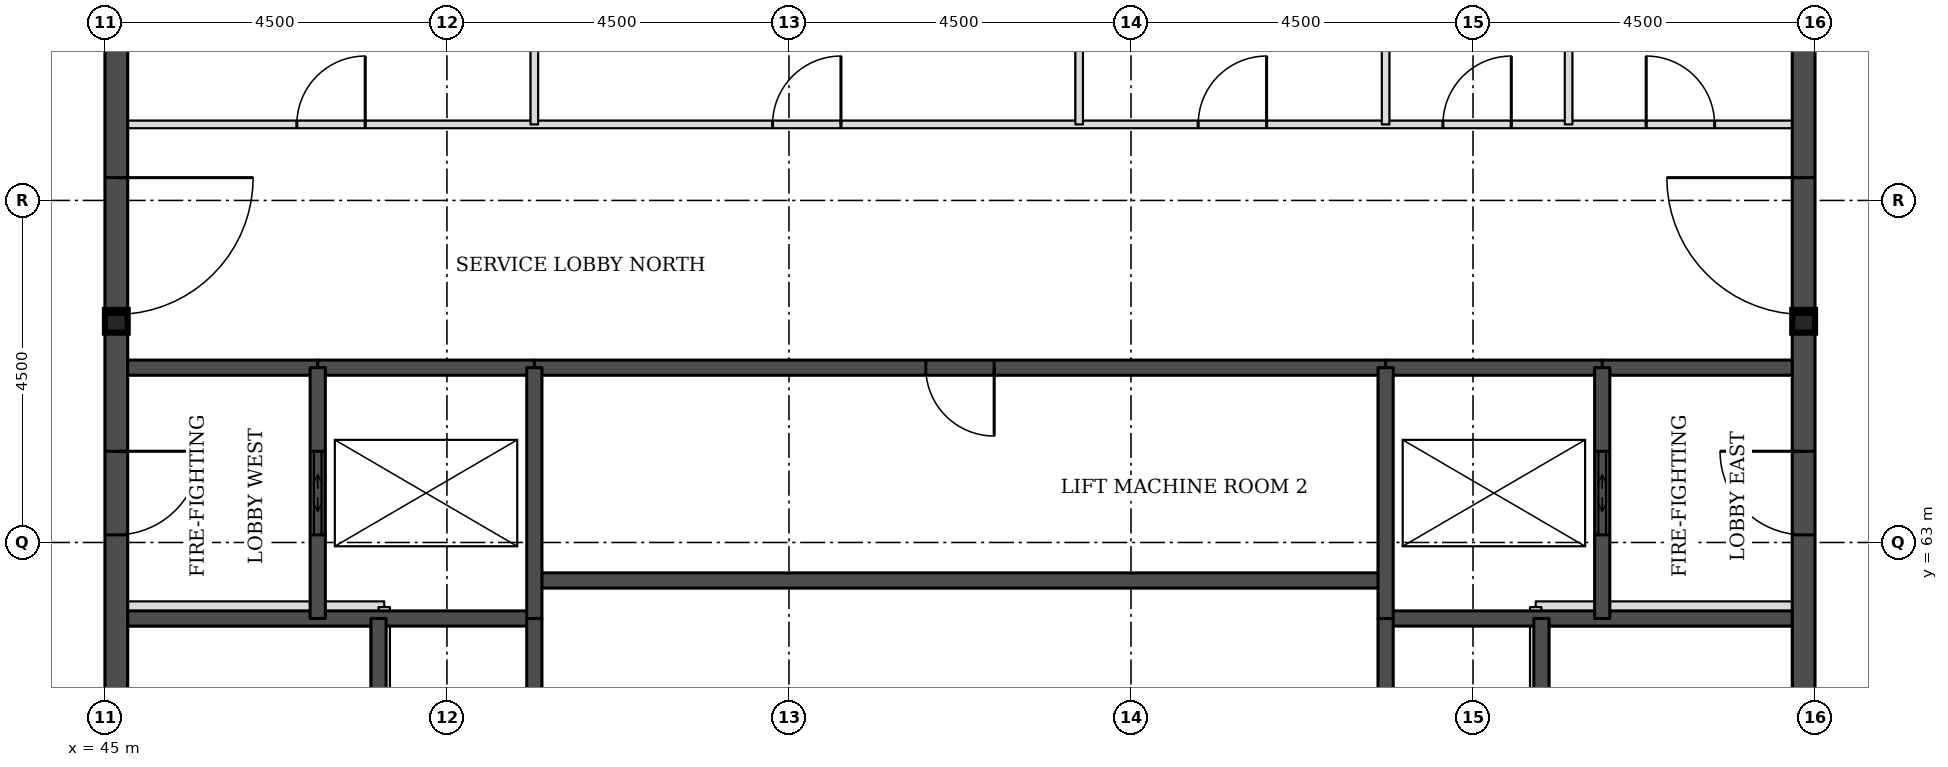
"""IFC4 building model, lengths in metres.
Left out: names, types, materials, properties, quantities, classifications, styles, units other than length and angle.
Written with IfcOpenShell. Run it as: python <this file> out.ifc"""

import sys

from ifc_helpers import new_model, si_unit, direction, frame, frame_2d, origin, place, context, subcontext, project, spatial, rectangle, extrude, element, fill, save


model = new_model("IFC4")
c1 = context("Model", 3, precision=1e-05, world=origin(), true_north=direction((0.0, 1.0)))
c2 = subcontext(c1, "Body", "Model", "MODEL_VIEW")
j1 = project(units=[si_unit("LENGTHUNIT", "METRE"), si_unit("PLANEANGLEUNIT", "RADIAN")], contexts=[c1])
p1 = place(None, origin())
s1 = spatial("IfcSite", under=j1, at=p1, CompositionType="ELEMENT")
p2 = place(p1, origin())
s2 = spatial("IfcBuilding", under=s1, at=p2, CompositionType="ELEMENT")
p3 = place(p2, frame((0.0, 0.0, 268.7)))
s3 = spatial("IfcBuildingStorey", under=s2, at=p3, CompositionType="ELEMENT", Elevation=268.7)
p4 = place(p3, frame((45.15, 49.5, 0.0), z_axis=(0.0, 0.0, 1.0), x_axis=(0.0, 1.0, 0.0)))
e1 = element("IfcWall", 1, at=p4, inside=s3, PredefinedType="SHEAR", context=c2, shape_type="SweptSolid", body=[
    extrude(rectangle(XDim=22.5, YDim=0.3, at=frame_2d((11.25, 0.0))), origin(), (0.0, 0.0, 1.0), 5.0),
])
p5 = place(p4, frame((4.2, 0.0, 0.0)))
e2 = element("IfcOpeningElement", 2, at=p5, cuts=e1, PredefinedType="OPENING", context=c2, shape_type="SweptSolid", body=[
    extrude(rectangle(XDim=1.8, YDim=2.1, at=frame_2d((0.9, 1.05))), frame((0.0, 0.16, 0.0), z_axis=(0.0, -1.0, 0.0), x_axis=(1.0, 0.0, 0.0)), (0.0, 0.0, 1.0), 0.32),
])
p6 = place(p4, frame((6.9, 0.0, 0.0)))
e3 = element("IfcOpeningElement", 3, at=p6, cuts=e1, PredefinedType="OPENING", context=c2, shape_type="SweptSolid", body=[
    extrude(rectangle(XDim=1.1, YDim=2.1, at=frame_2d((0.55, 1.05))), frame((0.0, 0.16, 0.0), z_axis=(0.0, -1.0, 0.0), x_axis=(1.0, 0.0, 0.0)), (0.0, 0.0, 1.0), 0.32),
])
p7 = place(p4, frame((13.6, 0.0, 0.0)))
e4 = element("IfcOpeningElement", 4, at=p7, cuts=e1, PredefinedType="OPENING", context=c2, shape_type="SweptSolid", body=[
    extrude(rectangle(XDim=1.1, YDim=2.1, at=frame_2d((0.55, 1.05))), frame((0.0, 0.16, 0.0), z_axis=(0.0, -1.0, 0.0), x_axis=(1.0, 0.0, 0.0)), (0.0, 0.0, 1.0), 0.32),
])
p8 = place(p4, frame((16.5, 0.0, 0.0)))
e5 = element("IfcOpeningElement", 5, at=p8, cuts=e1, PredefinedType="OPENING", context=c2, shape_type="SweptSolid", body=[
    extrude(rectangle(XDim=1.8, YDim=2.1, at=frame_2d((0.9, 1.05))), frame((0.0, 0.16, 0.0), z_axis=(0.0, -1.0, 0.0), x_axis=(1.0, 0.0, 0.0)), (0.0, 0.0, 1.0), 0.32),
])
p9 = place(p3, frame((67.35, 49.5, 0.0), z_axis=(0.0, 0.0, 1.0), x_axis=(0.0, 1.0, 0.0)))
e6 = element("IfcWall", 6, at=p9, inside=s3, PredefinedType="SHEAR", context=c2, shape_type="SweptSolid", body=[
    extrude(rectangle(XDim=22.5, YDim=0.3, at=frame_2d((11.25, 0.0))), origin(), (0.0, 0.0, 1.0), 5.0),
])
p10 = place(p9, frame((4.2, 0.0, 0.0)))
e7 = element("IfcOpeningElement", 7, at=p10, cuts=e6, PredefinedType="OPENING", context=c2, shape_type="SweptSolid", body=[
    extrude(rectangle(XDim=1.8, YDim=2.1, at=frame_2d((0.9, 1.05))), frame((0.0, 0.16, 0.0), z_axis=(0.0, -1.0, 0.0), x_axis=(1.0, 0.0, 0.0)), (0.0, 0.0, 1.0), 0.32),
])
p11 = place(p9, frame((6.9, 0.0, 0.0)))
e8 = element("IfcOpeningElement", 8, at=p11, cuts=e6, PredefinedType="OPENING", context=c2, shape_type="SweptSolid", body=[
    extrude(rectangle(XDim=1.1, YDim=2.1, at=frame_2d((0.55, 1.05))), frame((0.0, 0.16, 0.0), z_axis=(0.0, -1.0, 0.0), x_axis=(1.0, 0.0, 0.0)), (0.0, 0.0, 1.0), 0.32),
])
p12 = place(p9, frame((13.6, 0.0, 0.0)))
e9 = element("IfcOpeningElement", 9, at=p12, cuts=e6, PredefinedType="OPENING", context=c2, shape_type="SweptSolid", body=[
    extrude(rectangle(XDim=1.1, YDim=2.1, at=frame_2d((0.55, 1.05))), frame((0.0, 0.16, 0.0), z_axis=(0.0, -1.0, 0.0), x_axis=(1.0, 0.0, 0.0)), (0.0, 0.0, 1.0), 0.32),
])
p13 = place(p9, frame((16.5, 0.0, 0.0)))
e10 = element("IfcOpeningElement", 10, at=p13, cuts=e6, PredefinedType="OPENING", context=c2, shape_type="SweptSolid", body=[
    extrude(rectangle(XDim=1.8, YDim=2.1, at=frame_2d((0.9, 1.05))), frame((0.0, 0.16, 0.0), z_axis=(0.0, -1.0, 0.0), x_axis=(1.0, 0.0, 0.0)), (0.0, 0.0, 1.0), 0.32),
])
for number, where, z_axis, x_axis in (
    (11, (45.3, 62.0, 0.0), (0.0, 0.0, 1.0), (1.0, 0.0, 0.0)),
    (12, (61.85, 62.0, 0.0), (0.0, 0.0, 1.0), (1.0, 0.0, 0.0)),
):
    element("IfcWall", number, at=place(p3, frame(where, z_axis=z_axis, x_axis=x_axis)), inside=s3, PredefinedType="SOLIDWALL", context=c2, shape_type="SweptSolid", body=[
        extrude(rectangle(XDim=5.35, YDim=0.2, at=frame_2d((2.675, 0.0))), origin(), (0.0, 0.0, 1.0), 4.75),
    ])
p14 = place(p3, frame((50.65, 62.5, 0.0), z_axis=(0.0, 0.0, 1.0), x_axis=(1.0, 0.0, 0.0)))
e13 = element("IfcWall", 13, at=p14, inside=s3, PredefinedType="SOLIDWALL", context=c2, shape_type="SweptSolid", body=[
    extrude(rectangle(XDim=11.2, YDim=0.2, at=frame_2d((5.6, 0.0))), origin(), (0.0, 0.0, 1.0), 4.75),
])
for number, where, z_axis, x_axis in (
    (14, (45.3, 65.3, 0.0), (0.0, 0.0, 1.0), (1.0, 0.0, 0.0)),
    (15, (64.7, 65.3, 0.0), (0.0, 0.0, 1.0), (1.0, 0.0, 0.0)),
):
    element("IfcWall", number, at=place(p3, frame(where, z_axis=z_axis, x_axis=x_axis)), inside=s3, PredefinedType="SOLIDWALL", context=c2, shape_type="SweptSolid", body=[
        extrude(rectangle(XDim=2.5, YDim=0.2, at=frame_2d((1.25, 0.0))), origin(), (0.0, 0.0, 1.0), 4.75),
    ])
p15 = place(p3, frame((50.65, 65.3, 0.0), z_axis=(0.0, 0.0, 1.0), x_axis=(1.0, 0.0, 0.0)))
e16 = element("IfcWall", 16, at=p15, inside=s3, PredefinedType="SOLIDWALL", context=c2, shape_type="SweptSolid", body=[
    extrude(rectangle(XDim=11.2, YDim=0.2, at=frame_2d((5.6, 0.0))), origin(), (0.0, 0.0, 1.0), 4.75),
])
p16 = place(p15, frame((5.15, 0.0, 0.0)))
e17 = element("IfcOpeningElement", 17, at=p16, cuts=e16, PredefinedType="OPENING", context=c2, shape_type="SweptSolid", body=[
    extrude(rectangle(XDim=0.9, YDim=2.1, at=frame_2d((0.45, 1.05))), frame((0.0, 0.11, 0.0), z_axis=(0.0, -1.0, 0.0), x_axis=(1.0, 0.0, 0.0)), (0.0, 0.0, 1.0), 0.22),
])
for number, where, z_axis, x_axis in (
    (18, (47.8, 65.3, 0.0), (0.0, 0.0, 1.0), (1.0, 0.0, 0.0)),
    (19, (61.85, 65.3, 0.0), (0.0, 0.0, 1.0), (1.0, 0.0, 0.0)),
):
    element("IfcWall", number, at=place(p3, frame(where, z_axis=z_axis, x_axis=x_axis)), inside=s3, PredefinedType="SOLIDWALL", context=c2, shape_type="SweptSolid", body=[
        extrude(rectangle(XDim=2.85, YDim=0.2, at=frame_2d((1.425, 0.0))), origin(), (0.0, 0.0, 1.0), 4.75),
    ])
p17 = place(p3, frame((45.3, 68.5, 0.0), z_axis=(0.0, 0.0, 1.0), x_axis=(1.0, 0.0, 0.0)))
e20 = element("IfcWall", 20, at=p17, inside=s3, PredefinedType="PARTITIONING", context=c2, shape_type="SweptSolid", body=[
    extrude(rectangle(XDim=21.9, YDim=0.1, at=frame_2d((10.95, 0.0))), origin(), (0.0, 0.0, 1.0), 4.75),
])
p18 = place(p17, frame((19.979, 0.0, 0.0)))
e21 = element("IfcOpeningElement", 21, at=p18, cuts=e20, PredefinedType="OPENING", context=c2, shape_type="SweptSolid", body=[
    extrude(rectangle(XDim=0.9, YDim=2.1, at=frame_2d((0.45, 1.05))), frame((0.0, 0.06, 0.0), z_axis=(0.0, -1.0, 0.0), x_axis=(1.0, 0.0, 0.0)), (0.0, 0.0, 1.0), 0.12),
])
p19 = place(p17, frame((17.304, 0.0, 0.0)))
e22 = element("IfcOpeningElement", 22, at=p19, cuts=e20, PredefinedType="OPENING", context=c2, shape_type="SweptSolid", body=[
    extrude(rectangle(XDim=0.9, YDim=2.1, at=frame_2d((0.45, 1.05))), frame((0.0, 0.06, 0.0), z_axis=(0.0, -1.0, 0.0), x_axis=(1.0, 0.0, 0.0)), (0.0, 0.0, 1.0), 0.12),
])
p20 = place(p17, frame((2.225, 0.0, 0.0)))
e23 = element("IfcOpeningElement", 23, at=p20, cuts=e20, PredefinedType="OPENING", context=c2, shape_type="SweptSolid", body=[
    extrude(rectangle(XDim=0.9, YDim=2.1, at=frame_2d((0.45, 1.05))), frame((0.0, 0.06, 0.0), z_axis=(0.0, -1.0, 0.0), x_axis=(1.0, 0.0, 0.0)), (0.0, 0.0, 1.0), 0.12),
])
p21 = place(p17, frame((14.084, 0.0, 0.0)))
e24 = element("IfcOpeningElement", 24, at=p21, cuts=e20, PredefinedType="OPENING", context=c2, shape_type="SweptSolid", body=[
    extrude(rectangle(XDim=0.9, YDim=2.1, at=frame_2d((0.45, 1.05))), frame((0.0, 0.06, 0.0), z_axis=(0.0, -1.0, 0.0), x_axis=(1.0, 0.0, 0.0)), (0.0, 0.0, 1.0), 0.12),
])
p22 = place(p17, frame((8.484, 0.0, 0.0)))
e25 = element("IfcOpeningElement", 25, at=p22, cuts=e20, PredefinedType="OPENING", context=c2, shape_type="SweptSolid", body=[
    extrude(rectangle(XDim=0.9, YDim=2.1, at=frame_2d((0.45, 1.05))), frame((0.0, 0.06, 0.0), z_axis=(0.0, -1.0, 0.0), x_axis=(1.0, 0.0, 0.0)), (0.0, 0.0, 1.0), 0.12),
])
p23 = place(p3, frame((47.8, 62.0, 0.0), z_axis=(0.0, 0.0, 1.0), x_axis=(0.0, 1.0, 0.0)))
e26 = element("IfcWall", 26, at=p23, inside=s3, PredefinedType="SOLIDWALL", context=c2, shape_type="SweptSolid", body=[
    extrude(rectangle(XDim=3.3, YDim=0.2, at=frame_2d((1.65, 0.0))), origin(), (0.0, 0.0, 1.0), 4.75),
])
p24 = place(p23, frame((1.1, 0.0, 0.0)))
e27 = element("IfcOpeningElement", 27, at=p24, cuts=e26, PredefinedType="OPENING", context=c2, shape_type="SweptSolid", body=[
    extrude(rectangle(XDim=1.1, YDim=2.1, at=frame_2d((0.55, 1.05))), frame((0.0, 0.11, 0.0), z_axis=(0.0, -1.0, 0.0), x_axis=(1.0, 0.0, 0.0)), (0.0, 0.0, 1.0), 0.22),
])
p25 = place(p3, frame((48.6, 56.2, 0.0), z_axis=(0.0, 0.0, 1.0), x_axis=(0.0, 1.0, 0.0)))
e28 = element("IfcWall", 28, at=p25, inside=s3, PredefinedType="SOLIDWALL", context=c2, shape_type="SweptSolid", body=[
    extrude(rectangle(XDim=5.8, YDim=0.2, at=frame_2d((2.9, 0.0))), origin(), (0.0, 0.0, 1.0), 4.75),
])
p26 = place(p3, frame((50.65, 68.5, 0.0), z_axis=(0.0, 0.0, 1.0), x_axis=(0.0, 1.0, 0.0)))
e29 = element("IfcWall", 29, at=p26, inside=s3, PredefinedType="PARTITIONING", context=c2, shape_type="SweptSolid", body=[
    extrude(rectangle(XDim=3.2, YDim=0.1, at=frame_2d((1.6, 0.0))), origin(), (0.0, 0.0, 1.0), 4.75),
])
p27 = place(p3, frame((50.65, 56.2, 0.0), z_axis=(0.0, 0.0, 1.0), x_axis=(0.0, 1.0, 0.0)))
e30 = element("IfcWall", 30, at=p27, inside=s3, PredefinedType="SOLIDWALL", context=c2, shape_type="SweptSolid", body=[
    extrude(rectangle(XDim=5.8, YDim=0.2, at=frame_2d((2.9, 0.0))), origin(), (0.0, 0.0, 1.0), 4.75),
])
p28 = place(p3, frame((50.65, 62.0, 0.0), z_axis=(0.0, 0.0, 1.0), x_axis=(0.0, 1.0, 0.0)))
e31 = element("IfcWall", 31, at=p28, inside=s3, PredefinedType="SOLIDWALL", context=c2, shape_type="SweptSolid", body=[
    extrude(rectangle(XDim=3.3, YDim=0.2, at=frame_2d((1.65, 0.0))), origin(), (0.0, 0.0, 1.0), 4.75),
])
for number, where, z_axis, x_axis in (
    (32, (57.818, 68.5, 0.0), (0.0, 0.0, 1.0), (0.0, 1.0, 0.0)),
    (33, (61.85, 68.5, 0.0), (0.0, 0.0, 1.0), (0.0, 1.0, 0.0)),
):
    element("IfcWall", number, at=place(p3, frame(where, z_axis=z_axis, x_axis=x_axis)), inside=s3, PredefinedType="PARTITIONING", context=c2, shape_type="SweptSolid", body=[
        extrude(rectangle(XDim=3.2, YDim=0.1, at=frame_2d((1.6, 0.0))), origin(), (0.0, 0.0, 1.0), 4.75),
    ])
p29 = place(p3, frame((61.85, 56.2, 0.0), z_axis=(0.0, 0.0, 1.0), x_axis=(0.0, 1.0, 0.0)))
e34 = element("IfcWall", 34, at=p29, inside=s3, PredefinedType="SOLIDWALL", context=c2, shape_type="SweptSolid", body=[
    extrude(rectangle(XDim=5.8, YDim=0.2, at=frame_2d((2.9, 0.0))), origin(), (0.0, 0.0, 1.0), 4.75),
])
p30 = place(p3, frame((61.85, 62.0, 0.0), z_axis=(0.0, 0.0, 1.0), x_axis=(0.0, 1.0, 0.0)))
e35 = element("IfcWall", 35, at=p30, inside=s3, PredefinedType="SOLIDWALL", context=c2, shape_type="SweptSolid", body=[
    extrude(rectangle(XDim=3.3, YDim=0.2, at=frame_2d((1.65, 0.0))), origin(), (0.0, 0.0, 1.0), 4.75),
])
p31 = place(p3, frame((63.9, 56.2, 0.0), z_axis=(0.0, 0.0, 1.0), x_axis=(0.0, 1.0, 0.0)))
e36 = element("IfcWall", 36, at=p31, inside=s3, PredefinedType="SOLIDWALL", context=c2, shape_type="SweptSolid", body=[
    extrude(rectangle(XDim=5.8, YDim=0.2, at=frame_2d((2.9, 0.0))), origin(), (0.0, 0.0, 1.0), 4.75),
])
p32 = place(p3, frame((64.258, 68.5, 0.0), z_axis=(0.0, 0.0, 1.0), x_axis=(0.0, 1.0, 0.0)))
e37 = element("IfcWall", 37, at=p32, inside=s3, PredefinedType="PARTITIONING", context=c2, shape_type="SweptSolid", body=[
    extrude(rectangle(XDim=3.2, YDim=0.1, at=frame_2d((1.6, 0.0))), origin(), (0.0, 0.0, 1.0), 4.75),
])
p33 = place(p3, frame((64.7, 62.0, 0.0), z_axis=(0.0, 0.0, 1.0), x_axis=(0.0, 1.0, 0.0)))
e38 = element("IfcWall", 38, at=p33, inside=s3, PredefinedType="SOLIDWALL", context=c2, shape_type="SweptSolid", body=[
    extrude(rectangle(XDim=3.3, YDim=0.2, at=frame_2d((1.65, 0.0))), origin(), (0.0, 0.0, 1.0), 4.75),
])
p34 = place(p33, frame((1.1, 0.0, 0.0)))
e39 = element("IfcOpeningElement", 39, at=p34, cuts=e38, PredefinedType="OPENING", context=c2, shape_type="SweptSolid", body=[
    extrude(rectangle(XDim=1.1, YDim=2.1, at=frame_2d((0.55, 1.05))), frame((0.0, 0.11, 0.0), z_axis=(0.0, -1.0, 0.0), x_axis=(1.0, 0.0, 0.0)), (0.0, 0.0, 1.0), 0.22),
])
p35 = place(p24, origin())
e40 = element("IfcDoor", 40, at=p35, inside=s3, OperationType="DOUBLE_DOOR_SLIDING", PredefinedType="DOOR", context=c2, shape_type="SweptSolid", body=[
    extrude(rectangle(XDim=1.1, YDim=2.1, at=frame_2d((0.55, 1.05))), frame((0.0, 0.025, 0.0), z_axis=(0.0, -1.0, 0.0), x_axis=(1.0, 0.0, 0.0)), (0.0, 0.0, 1.0), 0.05),
])
fill(e27, e40)
p36 = place(p34, origin())
e41 = element("IfcDoor", 41, at=p36, inside=s3, OperationType="DOUBLE_DOOR_SLIDING", PredefinedType="DOOR", context=c2, shape_type="SweptSolid", body=[
    extrude(rectangle(XDim=1.1, YDim=2.1, at=frame_2d((0.55, 1.05))), frame((0.0, 0.025, 0.0), z_axis=(0.0, -1.0, 0.0), x_axis=(1.0, 0.0, 0.0)), (0.0, 0.0, 1.0), 0.05),
])
fill(e39, e41)
p37 = place(p7, frame((1.1, 0.0, 0.0), z_axis=(0.0, 0.0, 1.0), x_axis=(-1.0, 0.0, 0.0)))
e42 = element("IfcDoor", 42, at=p37, inside=s3, OperationType="SINGLE_SWING_LEFT", PredefinedType="DOOR", context=c2, shape_type="SweptSolid", body=[
    extrude(rectangle(XDim=1.1, YDim=2.1, at=frame_2d((0.55, 1.05))), frame((0.0, 0.025, 0.0), z_axis=(0.0, -1.0, 0.0), x_axis=(1.0, 0.0, 0.0)), (0.0, 0.0, 1.0), 0.05),
])
fill(e4, e42)
p38 = place(p8, frame((1.8, 0.0, 0.0), z_axis=(0.0, 0.0, 1.0), x_axis=(-1.0, 0.0, 0.0)))
e43 = element("IfcDoor", 43, at=p38, inside=s3, OperationType="SINGLE_SWING_LEFT", PredefinedType="DOOR", context=c2, shape_type="SweptSolid", body=[
    extrude(rectangle(XDim=1.8, YDim=2.1, at=frame_2d((0.9, 1.05))), frame((0.0, 0.025, 0.0), z_axis=(0.0, -1.0, 0.0), x_axis=(1.0, 0.0, 0.0)), (0.0, 0.0, 1.0), 0.05),
])
fill(e5, e43)
p39 = place(p12, origin())
e44 = element("IfcDoor", 44, at=p39, inside=s3, OperationType="SINGLE_SWING_RIGHT", PredefinedType="DOOR", context=c2, shape_type="SweptSolid", body=[
    extrude(rectangle(XDim=1.1, YDim=2.1, at=frame_2d((0.55, 1.05))), frame((0.0, 0.025, 0.0), z_axis=(0.0, -1.0, 0.0), x_axis=(1.0, 0.0, 0.0)), (0.0, 0.0, 1.0), 0.05),
])
fill(e9, e44)
p40 = place(p13, origin())
e45 = element("IfcDoor", 45, at=p40, inside=s3, OperationType="SINGLE_SWING_RIGHT", PredefinedType="DOOR", context=c2, shape_type="SweptSolid", body=[
    extrude(rectangle(XDim=1.8, YDim=2.1, at=frame_2d((0.9, 1.05))), frame((0.0, 0.025, 0.0), z_axis=(0.0, -1.0, 0.0), x_axis=(1.0, 0.0, 0.0)), (0.0, 0.0, 1.0), 0.05),
])
fill(e10, e45)
p41 = place(p18, origin())
e46 = element("IfcDoor", 46, at=p41, inside=s3, OperationType="SINGLE_SWING_LEFT", PredefinedType="DOOR", context=c2, shape_type="SweptSolid", body=[
    extrude(rectangle(XDim=0.9, YDim=2.1, at=frame_2d((0.45, 1.05))), frame((0.0, 0.025, 0.0), z_axis=(0.0, -1.0, 0.0), x_axis=(1.0, 0.0, 0.0)), (0.0, 0.0, 1.0), 0.05),
])
fill(e21, e46)
p42 = place(p19, origin())
e47 = element("IfcDoor", 47, at=p42, inside=s3, OperationType="SINGLE_SWING_RIGHT", PredefinedType="DOOR", context=c2, shape_type="SweptSolid", body=[
    extrude(rectangle(XDim=0.9, YDim=2.1, at=frame_2d((0.45, 1.05))), frame((0.0, 0.025, 0.0), z_axis=(0.0, -1.0, 0.0), x_axis=(1.0, 0.0, 0.0)), (0.0, 0.0, 1.0), 0.05),
])
fill(e22, e47)
p43 = place(p20, origin())
e48 = element("IfcDoor", 48, at=p43, inside=s3, OperationType="SINGLE_SWING_RIGHT", PredefinedType="DOOR", context=c2, shape_type="SweptSolid", body=[
    extrude(rectangle(XDim=0.9, YDim=2.1, at=frame_2d((0.45, 1.05))), frame((0.0, 0.025, 0.0), z_axis=(0.0, -1.0, 0.0), x_axis=(1.0, 0.0, 0.0)), (0.0, 0.0, 1.0), 0.05),
])
fill(e23, e48)
p44 = place(p16, frame((0.9, 0.0, 0.0), z_axis=(0.0, 0.0, 1.0), x_axis=(-1.0, 0.0, 0.0)))
e49 = element("IfcDoor", 49, at=p44, inside=s3, OperationType="SINGLE_SWING_LEFT", PredefinedType="DOOR", context=c2, shape_type="SweptSolid", body=[
    extrude(rectangle(XDim=0.9, YDim=2.1, at=frame_2d((0.45, 1.05))), frame((0.0, 0.025, 0.0), z_axis=(0.0, -1.0, 0.0), x_axis=(1.0, 0.0, 0.0)), (0.0, 0.0, 1.0), 0.05),
])
fill(e17, e49)
p45 = place(p21, origin())
e50 = element("IfcDoor", 50, at=p45, inside=s3, OperationType="SINGLE_SWING_RIGHT", PredefinedType="DOOR", context=c2, shape_type="SweptSolid", body=[
    extrude(rectangle(XDim=0.9, YDim=2.1, at=frame_2d((0.45, 1.05))), frame((0.0, 0.025, 0.0), z_axis=(0.0, -1.0, 0.0), x_axis=(1.0, 0.0, 0.0)), (0.0, 0.0, 1.0), 0.05),
])
fill(e24, e50)
p46 = place(p22, origin())
e51 = element("IfcDoor", 51, at=p46, inside=s3, OperationType="SINGLE_SWING_RIGHT", PredefinedType="DOOR", context=c2, shape_type="SweptSolid", body=[
    extrude(rectangle(XDim=0.9, YDim=2.1, at=frame_2d((0.45, 1.05))), frame((0.0, 0.025, 0.0), z_axis=(0.0, -1.0, 0.0), x_axis=(1.0, 0.0, 0.0)), (0.0, 0.0, 1.0), 0.05),
])
fill(e25, e51)
save(model, sys.argv[1])
